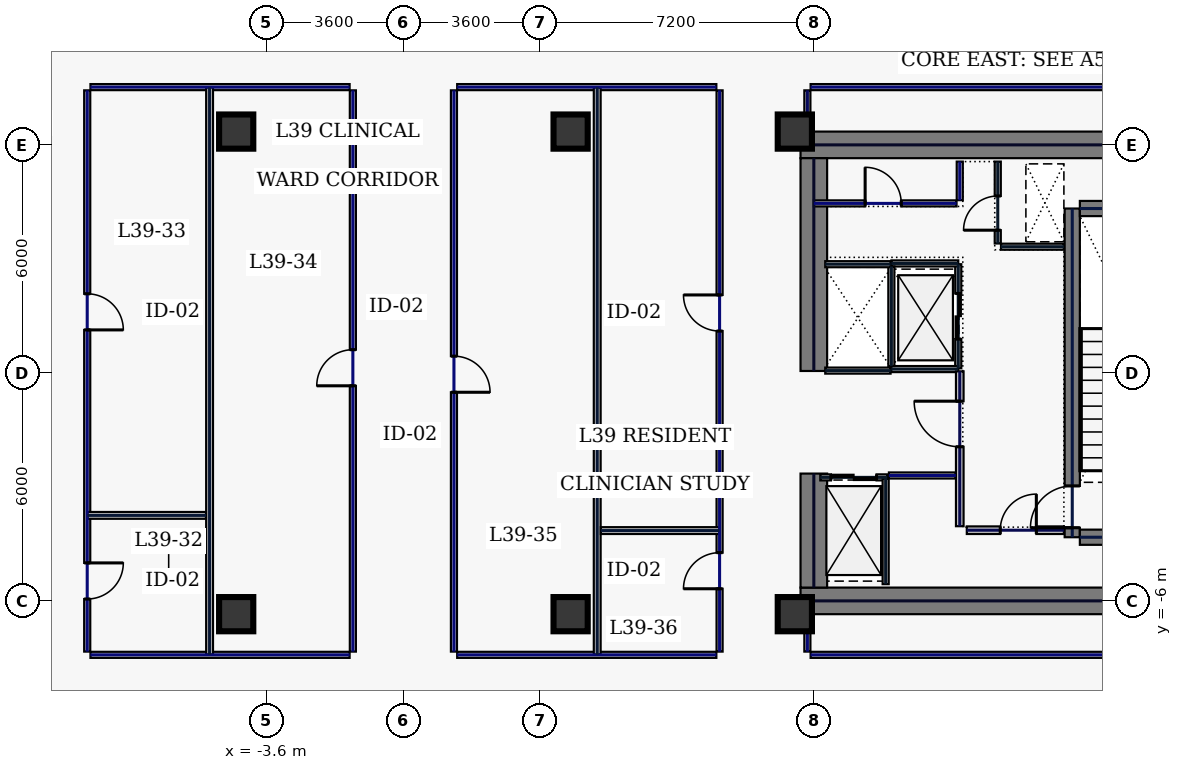
"""IFC4 building model, lengths in metres.
Left out: names, types, materials, properties, quantities, classifications, styles, units other than length and angle.
Written with IfcOpenShell. Run it as: python <this file> out.ifc"""

import sys

from ifc_helpers import new_model, si_unit, direction, frame, frame_2d, origin, origin_2d, place, context, subcontext, project, spatial, rectangle, hollow_rectangle, extrude, element, fill, save


model = new_model("IFC4")
c1 = context("Model", 3, precision=1e-05, world=origin(), true_north=direction((0.0, 1.0)))
c2 = subcontext(c1, "Body", "Model", "MODEL_VIEW")
j1 = project(units=[si_unit("LENGTHUNIT", "METRE"), si_unit("PLANEANGLEUNIT", "RADIAN")], contexts=[c1])
p1 = place(None, origin())
s1 = spatial("IfcSite", under=j1, at=p1, CompositionType="ELEMENT")
p2 = place(p1, origin())
s2 = spatial("IfcBuilding", under=s1, at=p2, CompositionType="ELEMENT")
p3 = place(p2, frame((0.0, 0.0, 172.2)))
s3 = spatial("IfcBuildingStorey", under=s2, at=p3, CompositionType="ELEMENT", Elevation=172.2)
for number, where, z_axis, x_axis in (
    (1, (10.45, 6.0, 0.0), (0.0, 0.0, 1.0), (1.0, 0.0, 0.0)),
    (2, (10.45, -6.0, 0.0), (0.0, 0.0, 1.0), (1.0, 0.0, 0.0)),
):
    element("IfcWall", number, at=place(p3, frame(where, z_axis=z_axis, x_axis=x_axis)), inside=s3, PredefinedType="SHEAR", context=c2, shape_type="SweptSolid", body=[
        extrude(rectangle(XDim=11.55, YDim=0.7, at=frame_2d((5.775, 0.0))), origin(), (0.0, 0.0, 1.0), 3.74),
    ])
p4 = place(p3, frame((10.8, -5.65, 0.0), z_axis=(0.0, 0.0, 1.0), x_axis=(0.0, 1.0, 0.0)))
e3 = element("IfcWall", 3, at=p4, inside=s3, PredefinedType="SHEAR", context=c2, shape_type="SweptSolid", body=[
    extrude(rectangle(XDim=3.0, YDim=0.7, at=frame_2d((1.5, 0.0))), origin(), (0.0, 0.0, 1.0), 3.74),
])
p5 = place(p3, frame((10.8, 0.05, 0.0), z_axis=(0.0, 0.0, 1.0), x_axis=(0.0, 1.0, 0.0)))
e4 = element("IfcWall", 4, at=p5, inside=s3, PredefinedType="SHEAR", context=c2, shape_type="SweptSolid", body=[
    extrude(rectangle(XDim=5.6, YDim=0.7, at=frame_2d((2.8, 0.0))), origin(), (0.0, 0.0, 1.0), 3.74),
])
p6 = place(p3, frame((17.6, -4.325, 0.0), z_axis=(0.0, 0.0, 1.0), x_axis=(0.0, 1.0, 0.0)))
e5 = element("IfcWall", 5, at=p6, inside=s3, PredefinedType="SHEAR", context=c2, shape_type="SweptSolid", body=[
    extrude(rectangle(XDim=8.65, YDim=0.4, at=frame_2d((4.325, 0.0))), origin(), (0.0, 0.0, 1.0), 3.74),
])
p7 = place(p6, frame((0.25, 0.0, 0.0)))
e6 = element("IfcOpeningElement", 6, at=p7, cuts=e5, PredefinedType="OPENING", context=c2, shape_type="SweptSolid", body=[
    extrude(rectangle(XDim=1.1, YDim=2.2, at=frame_2d((0.55, 1.1))), frame((0.0, 0.21, 0.0), z_axis=(0.0, -1.0, 0.0), x_axis=(1.0, 0.0, 0.0)), (0.0, 0.0, 1.0), 0.42),
])
for number, where, z_axis, x_axis in (
    (7, (17.8, -4.325, 0.0), (0.0, 0.0, 1.0), (1.0, 0.0, 0.0)),
    (8, (17.8, 4.325, 0.0), (0.0, 0.0, 1.0), (1.0, 0.0, 0.0)),
):
    element("IfcWall", number, at=place(p3, frame(where, z_axis=z_axis, x_axis=x_axis)), inside=s3, PredefinedType="SHEAR", context=c2, shape_type="SweptSolid", body=[
        extrude(rectangle(XDim=3.4, YDim=0.4, at=frame_2d((1.7, 0.0))), origin(), (0.0, 0.0, 1.0), 3.74),
    ])
for number, where, z_axis, x_axis in (
    (9, (10.3, -6.35, 0.0), (0.0, 0.0, 1.0), (1.0, 0.0, 0.0)),
    (10, (10.3, 6.35, 0.0), (0.0, 0.0, 1.0), (1.0, 0.0, 0.0)),
    (11, (-4.4, -6.35, 0.0), (0.0, 0.0, 1.0), (1.0, 0.0, 0.0)),
    (12, (4.4, -6.35, 0.0), (0.0, 0.0, 1.0), (1.0, 0.0, 0.0)),
    (13, (-4.4, 6.35, 0.0), (0.0, 0.0, 1.0), (1.0, 0.0, 0.0)),
    (14, (4.4, 6.35, 0.0), (0.0, 0.0, 1.0), (1.0, 0.0, 0.0)),
):
    element("IfcColumn", number, at=place(p3, frame(where, z_axis=z_axis, x_axis=x_axis)), inside=s3, PredefinedType="COLUMN", context=c2, shape_type="SweptSolid", body=[
        extrude(hollow_rectangle(XDim=0.9, YDim=0.9, WallThickness=0.04, at=origin_2d()), origin(), (0.0, 0.0, 1.0), 3.74),
    ])
p8 = place(p3, frame((14.6, 0.12, 0.0), z_axis=(0.0, 0.0, 1.0), x_axis=(0.0, 1.0, 0.0)))
e15 = element("IfcWall", 15, at=p8, inside=s3, PredefinedType="PARTITIONING", context=c2, shape_type="SweptSolid", body=[
    extrude(rectangle(XDim=2.74, YDim=0.16, at=frame_2d((1.37, 0.0))), origin(), (0.0, 0.0, 1.0), 3.74),
])
p9 = place(p8, frame((0.77, 0.0, 0.0)))
e16 = element("IfcOpeningElement", 16, at=p9, cuts=e15, PredefinedType="OPENING", context=c2, shape_type="SweptSolid", body=[
    extrude(rectangle(XDim=1.2, YDim=2.2, at=frame_2d((0.6, 1.1))), frame((0.0, 0.09, 0.0), z_axis=(0.0, -1.0, 0.0), x_axis=(1.0, 0.0, 0.0)), (0.0, 0.0, 1.0), 0.18),
])
for number, where, z_axis, x_axis in (
    (17, (12.84, 0.1, 0.0), (0.0, 0.0, 1.0), (1.0, 0.0, 0.0)),
    (18, (12.84, 2.88, 0.0), (0.0, 0.0, 1.0), (1.0, 0.0, 0.0)),
):
    element("IfcWall", number, at=place(p3, frame(where, z_axis=z_axis, x_axis=x_axis)), inside=s3, PredefinedType="PARTITIONING", context=c2, shape_type="SweptSolid", body=[
        extrude(rectangle(XDim=1.76, YDim=0.16, at=frame_2d((0.88, 0.0))), origin(), (0.0, 0.0, 1.0), 3.74),
    ])
p10 = place(p3, frame((12.84, 0.18, 0.0), z_axis=(0.0, 0.0, 1.0), x_axis=(0.0, 1.0, 0.0)))
e19 = element("IfcWall", 19, at=p10, inside=s3, PredefinedType="PARTITIONING", context=c2, shape_type="SweptSolid", body=[
    extrude(rectangle(XDim=2.62, YDim=0.16, at=frame_2d((1.31, 0.0))), origin(), (0.0, 0.0, 1.0), 3.74),
])
p11 = place(p3, frame((10.97, -2.75, 0.0), z_axis=(0.0, 0.0, 1.0), x_axis=(1.0, 0.0, 0.0)))
e20 = element("IfcWall", 20, at=p11, inside=s3, PredefinedType="PARTITIONING", context=c2, shape_type="SweptSolid", body=[
    extrude(rectangle(XDim=1.76, YDim=0.16, at=frame_2d((0.88, 0.0))), origin(), (0.0, 0.0, 1.0), 3.74),
])
p12 = place(p11, frame((0.28, 0.0, 0.0)))
e21 = element("IfcOpeningElement", 21, at=p12, cuts=e20, PredefinedType="OPENING", context=c2, shape_type="SweptSolid", body=[
    extrude(rectangle(XDim=1.2, YDim=2.2, at=frame_2d((0.6, 1.1))), frame((0.0, 0.09, 0.0), z_axis=(0.0, -1.0, 0.0), x_axis=(1.0, 0.0, 0.0)), (0.0, 0.0, 1.0), 0.18),
])
for number, where, z_axis, x_axis in (
    (22, (11.1, 0.06, 0.0), (0.0, 0.0, 1.0), (1.0, 0.0, 0.0)),
    (23, (11.1, 2.86, 0.0), (0.0, 0.0, 1.0), (1.0, 0.0, 0.0)),
):
    element("IfcWall", number, at=place(p3, frame(where, z_axis=z_axis, x_axis=x_axis)), inside=s3, PredefinedType="PARTITIONING", context=c2, shape_type="SweptSolid", body=[
        extrude(rectangle(XDim=1.72, YDim=0.16, at=frame_2d((0.86, 0.0))), origin(), (0.0, 0.0, 1.0), 3.74),
    ])
p13 = place(p3, frame((15.64, 3.405, 0.0), z_axis=(0.0, 0.0, 1.0), x_axis=(0.0, 1.0, 0.0)))
e24 = element("IfcWall", 24, at=p13, inside=s3, PredefinedType="PARTITIONING", context=c2, shape_type="SweptSolid", body=[
    extrude(rectangle(XDim=2.155, YDim=0.16, at=frame_2d((1.078, 0.0))), origin(), (0.0, 0.0, 1.0), 3.74),
])
p14 = place(p13, frame((0.35, 0.0, 0.0)))
e25 = element("IfcOpeningElement", 25, at=p14, cuts=e24, PredefinedType="OPENING", context=c2, shape_type="SweptSolid", body=[
    extrude(rectangle(XDim=0.9, YDim=2.2, at=frame_2d((0.45, 1.1))), frame((0.0, 0.09, 0.0), z_axis=(0.0, -1.0, 0.0), x_axis=(1.0, 0.0, 0.0)), (0.0, 0.0, 1.0), 0.18),
])
p15 = place(p3, frame((15.725, 3.32, 0.0), z_axis=(0.0, 0.0, 1.0), x_axis=(1.0, 0.0, 0.0)))
e26 = element("IfcWall", 26, at=p15, inside=s3, PredefinedType="PARTITIONING", context=c2, shape_type="SweptSolid", body=[
    extrude(rectangle(XDim=1.655, YDim=0.16, at=frame_2d((0.827, 0.0))), origin(), (0.0, 0.0, 1.0), 3.74),
])
p16 = place(p3, frame((14.825, -4.14, 0.0), z_axis=(0.0, 0.0, 1.0), x_axis=(1.0, 0.0, 0.0)))
e27 = element("IfcWall", 27, at=p16, inside=s3, PredefinedType="SOLIDWALL", context=c2, shape_type="SweptSolid", body=[
    extrude(rectangle(XDim=2.555, YDim=0.2, at=frame_2d((1.277, 0.0))), origin(), (0.0, 0.0, 1.0), 3.74),
])
p17 = place(p16, frame((0.88, 0.0, 0.0)))
e28 = element("IfcOpeningElement", 28, at=p17, cuts=e27, PredefinedType="OPENING", context=c2, shape_type="SweptSolid", body=[
    extrude(rectangle(XDim=0.95, YDim=2.2, at=frame_2d((0.475, 1.1))), frame((0.0, 0.11, 0.0), z_axis=(0.0, -1.0, 0.0), x_axis=(1.0, 0.0, 0.0)), (0.0, 0.0, 1.0), 0.22),
])
p18 = place(p3, frame((12.775, -2.7, 0.0), z_axis=(0.0, 0.0, 1.0), x_axis=(1.0, 0.0, 0.0)))
e29 = element("IfcWall", 29, at=p18, inside=s3, PredefinedType="PARTITIONING", context=c2, shape_type="SweptSolid", body=[
    extrude(rectangle(XDim=1.76, YDim=0.16, at=frame_2d((0.88, 0.0))), origin(), (0.0, 0.0, 1.0), 3.74),
])
p19 = place(p3, frame((12.69, -5.56, 0.0), z_axis=(0.0, 0.0, 1.0), x_axis=(0.0, 1.0, 0.0)))
e30 = element("IfcWall", 30, at=p19, inside=s3, PredefinedType="PARTITIONING", context=c2, shape_type="SweptSolid", body=[
    extrude(rectangle(XDim=2.775, YDim=0.16, at=frame_2d((1.388, 0.0))), origin(), (0.0, 0.0, 1.0), 3.74),
])
p20 = place(p3, frame((10.8, 4.46, 0.0), z_axis=(0.0, 0.0, 1.0), x_axis=(1.0, 0.0, 0.0)))
e31 = element("IfcWall", 31, at=p20, inside=s3, PredefinedType="PARTITIONING", context=c2, shape_type="SweptSolid", body=[
    extrude(rectangle(XDim=3.755, YDim=0.16, at=frame_2d((1.877, 0.0))), origin(), (0.0, 0.0, 1.0), 3.74),
])
p21 = place(p20, frame((1.35, 0.0, 0.0)))
e32 = element("IfcOpeningElement", 32, at=p21, cuts=e31, PredefinedType="OPENING", context=c2, shape_type="SweptSolid", body=[
    extrude(rectangle(XDim=0.95, YDim=2.2, at=frame_2d((0.475, 1.1))), frame((0.0, 0.09, 0.0), z_axis=(0.0, -1.0, 0.0), x_axis=(1.0, 0.0, 0.0)), (0.0, 0.0, 1.0), 0.18),
])
p22 = place(p3, frame((14.64, 4.545, 0.0), z_axis=(0.0, 0.0, 1.0), x_axis=(0.0, 1.0, 0.0)))
e33 = element("IfcWall", 33, at=p22, inside=s3, PredefinedType="PARTITIONING", context=c2, shape_type="SweptSolid", body=[
    extrude(rectangle(XDim=1.015, YDim=0.16, at=frame_2d((0.508, 0.0))), origin(), (0.0, 0.0, 1.0), 3.74),
])
p23 = place(p3, frame((14.64, -4.035, 0.0), z_axis=(0.0, 0.0, 1.0), x_axis=(0.0, 1.0, 0.0)))
e34 = element("IfcWall", 34, at=p23, inside=s3, PredefinedType="SOLIDWALL", context=c2, shape_type="SweptSolid", body=[
    extrude(rectangle(XDim=4.075, YDim=0.2, at=frame_2d((2.038, 0.0))), origin(), (0.0, 0.0, 1.0), 3.74),
])
p24 = place(p23, frame((2.09, 0.0, 0.0)))
e35 = element("IfcOpeningElement", 35, at=p24, cuts=e34, PredefinedType="OPENING", context=c2, shape_type="SweptSolid", body=[
    extrude(rectangle(XDim=1.2, YDim=2.2, at=frame_2d((0.6, 1.1))), frame((0.0, 0.11, 0.0), z_axis=(0.0, -1.0, 0.0), x_axis=(1.0, 0.0, 0.0)), (0.0, 0.0, 1.0), 0.22),
])
p25 = place(p3, frame((24.965, 7.52, 0.0), z_axis=(0.0, 0.0, 1.0), x_axis=(-1.0, 0.0, 0.0)))
e36 = element("IfcWall", 36, at=p25, inside=s3, PredefinedType="PARTITIONING", context=c2, shape_type="SweptSolid", body=[
    extrude(rectangle(XDim=14.25, YDim=0.16, at=frame_2d((7.125, 0.0))), origin(), (0.0, 0.0, 1.0), 3.74),
])
p26 = place(p3, frame((10.63, 7.435, 0.0), z_axis=(0.0, 0.0, 1.0), x_axis=(0.0, -1.0, 0.0)))
e37 = element("IfcWall", 37, at=p26, inside=s3, PredefinedType="PARTITIONING", context=c2, shape_type="SweptSolid", body=[
    extrude(rectangle(XDim=1.015, YDim=0.16, at=frame_2d((0.508, 0.0))), origin(), (0.0, 0.0, 1.0), 1.535),
])
p27 = place(p3, frame((10.63, -6.42, 0.0), z_axis=(0.0, 0.0, 1.0), x_axis=(0.0, -1.0, 0.0)))
e38 = element("IfcWall", 38, at=p27, inside=s3, PredefinedType="PARTITIONING", context=c2, shape_type="SweptSolid", body=[
    extrude(rectangle(XDim=0.915, YDim=0.16, at=frame_2d((0.458, 0.0))), origin(), (0.0, 0.0, 1.0), 3.74),
])
p28 = place(p3, frame((10.715, -7.42, 0.0), z_axis=(0.0, 0.0, 1.0), x_axis=(1.0, 0.0, 0.0)))
e39 = element("IfcWall", 39, at=p28, inside=s3, PredefinedType="PARTITIONING", context=c2, shape_type="SweptSolid", body=[
    extrude(rectangle(XDim=14.25, YDim=0.16, at=frame_2d((7.125, 0.0))), origin(), (0.0, 0.0, 1.0), 3.74),
])
p29 = place(p3, frame((8.235, 7.52, 0.0), z_axis=(0.0, 0.0, 1.0), x_axis=(-1.0, 0.0, 0.0)))
e40 = element("IfcWall", 40, at=p29, inside=s3, PredefinedType="PARTITIONING", context=c2, shape_type="SweptSolid", body=[
    extrude(rectangle(XDim=6.82, YDim=0.16, at=frame_2d((3.41, 0.0))), origin(), (0.0, 0.0, 1.0), 3.74),
])
p30 = place(p3, frame((1.33, 7.435, 0.0), z_axis=(0.0, 0.0, 1.0), x_axis=(0.0, -1.0, 0.0)))
e41 = element("IfcWall", 41, at=p30, inside=s3, PredefinedType="PARTITIONING", context=c2, shape_type="SweptSolid", body=[
    extrude(rectangle(XDim=14.77, YDim=0.16, at=frame_2d((7.385, 0.0))), origin(), (0.0, 0.0, 1.0), 3.74),
])
p31 = place(p30, frame((6.995, 0.0, 0.0)))
e42 = element("IfcOpeningElement", 42, at=p31, cuts=e41, PredefinedType="OPENING", context=c2, shape_type="SweptSolid", body=[
    extrude(rectangle(XDim=0.95, YDim=2.2, at=frame_2d((0.475, 1.1))), frame((0.0, 0.09, 0.0), z_axis=(0.0, -1.0, 0.0), x_axis=(1.0, 0.0, 0.0)), (0.0, 0.0, 1.0), 0.18),
])
p32 = place(p3, frame((1.415, -7.42, 0.0), z_axis=(0.0, 0.0, 1.0), x_axis=(1.0, 0.0, 0.0)))
e43 = element("IfcWall", 43, at=p32, inside=s3, PredefinedType="PARTITIONING", context=c2, shape_type="SweptSolid", body=[
    extrude(rectangle(XDim=6.82, YDim=0.16, at=frame_2d((3.41, 0.0))), origin(), (0.0, 0.0, 1.0), 3.74),
])
p33 = place(p3, frame((8.32, -7.335, 0.0), z_axis=(0.0, 0.0, 1.0), x_axis=(0.0, 1.0, 0.0)))
e44 = element("IfcWall", 44, at=p33, inside=s3, PredefinedType="PARTITIONING", context=c2, shape_type="SweptSolid", body=[
    extrude(rectangle(XDim=14.77, YDim=0.16, at=frame_2d((7.385, 0.0))), origin(), (0.0, 0.0, 1.0), 3.74),
])
p34 = place(p33, frame((1.654, 0.0, 0.0)))
e45 = element("IfcOpeningElement", 45, at=p34, cuts=e44, PredefinedType="OPENING", context=c2, shape_type="SweptSolid", body=[
    extrude(rectangle(XDim=0.95, YDim=2.2, at=frame_2d((0.475, 1.1))), frame((0.0, 0.09, 0.0), z_axis=(0.0, -1.0, 0.0), x_axis=(1.0, 0.0, 0.0)), (0.0, 0.0, 1.0), 0.18),
])
p35 = place(p33, frame((8.436, 0.0, 0.0)))
e46 = element("IfcOpeningElement", 46, at=p35, cuts=e44, PredefinedType="OPENING", context=c2, shape_type="SweptSolid", body=[
    extrude(rectangle(XDim=0.95, YDim=2.2, at=frame_2d((0.475, 1.1))), frame((0.0, 0.09, 0.0), z_axis=(0.0, -1.0, 0.0), x_axis=(1.0, 0.0, 0.0)), (0.0, 0.0, 1.0), 0.18),
])
p36 = place(p3, frame((-1.33, -7.335, 0.0), z_axis=(0.0, 0.0, 1.0), x_axis=(0.0, 1.0, 0.0)))
e47 = element("IfcWall", 47, at=p36, inside=s3, PredefinedType="PARTITIONING", context=c2, shape_type="SweptSolid", body=[
    extrude(rectangle(XDim=14.77, YDim=0.16, at=frame_2d((7.385, 0.0))), origin(), (0.0, 0.0, 1.0), 3.74),
])
p37 = place(p36, frame((6.995, 0.0, 0.0)))
e48 = element("IfcOpeningElement", 48, at=p37, cuts=e47, PredefinedType="OPENING", context=c2, shape_type="SweptSolid", body=[
    extrude(rectangle(XDim=0.95, YDim=2.2, at=frame_2d((0.475, 1.1))), frame((0.0, 0.09, 0.0), z_axis=(0.0, -1.0, 0.0), x_axis=(1.0, 0.0, 0.0)), (0.0, 0.0, 1.0), 0.18),
])
p38 = place(p3, frame((-1.415, 7.52, 0.0), z_axis=(0.0, 0.0, 1.0), x_axis=(-1.0, 0.0, 0.0)))
e49 = element("IfcWall", 49, at=p38, inside=s3, PredefinedType="PARTITIONING", context=c2, shape_type="SweptSolid", body=[
    extrude(rectangle(XDim=6.82, YDim=0.16, at=frame_2d((3.41, 0.0))), origin(), (0.0, 0.0, 1.0), 3.74),
])
p39 = place(p3, frame((-8.32, 7.435, 0.0), z_axis=(0.0, 0.0, 1.0), x_axis=(0.0, -1.0, 0.0)))
e50 = element("IfcWall", 50, at=p39, inside=s3, PredefinedType="PARTITIONING", context=c2, shape_type="SweptSolid", body=[
    extrude(rectangle(XDim=14.77, YDim=0.16, at=frame_2d((7.385, 0.0))), origin(), (0.0, 0.0, 1.0), 3.74),
])
p40 = place(p39, frame((12.436, 0.0, 0.0)))
e51 = element("IfcOpeningElement", 51, at=p40, cuts=e50, PredefinedType="OPENING", context=c2, shape_type="SweptSolid", body=[
    extrude(rectangle(XDim=0.95, YDim=2.2, at=frame_2d((0.475, 1.1))), frame((0.0, 0.09, 0.0), z_axis=(0.0, -1.0, 0.0), x_axis=(1.0, 0.0, 0.0)), (0.0, 0.0, 1.0), 0.18),
])
p41 = place(p39, frame((5.354, 0.0, 0.0)))
e52 = element("IfcOpeningElement", 52, at=p41, cuts=e50, PredefinedType="OPENING", context=c2, shape_type="SweptSolid", body=[
    extrude(rectangle(XDim=0.95, YDim=2.2, at=frame_2d((0.475, 1.1))), frame((0.0, 0.09, 0.0), z_axis=(0.0, -1.0, 0.0), x_axis=(1.0, 0.0, 0.0)), (0.0, 0.0, 1.0), 0.18),
])
p42 = place(p3, frame((-8.235, -7.42, 0.0), z_axis=(0.0, 0.0, 1.0), x_axis=(1.0, 0.0, 0.0)))
e53 = element("IfcWall", 53, at=p42, inside=s3, PredefinedType="PARTITIONING", context=c2, shape_type="SweptSolid", body=[
    extrude(rectangle(XDim=6.82, YDim=0.16, at=frame_2d((3.41, 0.0))), origin(), (0.0, 0.0, 1.0), 3.74),
])
for number, where, z_axis, x_axis in (
    (54, (-5.1, -7.415, 0.0), (0.0, 0.0, 1.0), (0.0, 1.0, 0.0)),
    (55, (5.1, -7.415, 0.0), (0.0, 0.0, 1.0), (0.0, 1.0, 0.0)),
):
    element("IfcWall", number, at=place(p3, frame(where, z_axis=z_axis, x_axis=x_axis)), inside=s3, PredefinedType="PARTITIONING", context=c2, shape_type="SweptSolid", body=[
        extrude(rectangle(XDim=14.93, YDim=0.18, at=frame_2d((7.465, 0.0))), origin(), (0.0, 0.0, 1.0), 3.74),
    ])
for number, where, z_axis, x_axis in (
    (56, (-8.315, -3.75, 0.0), (0.0, 0.0, 1.0), (1.0, 0.0, 0.0)),
    (57, (5.195, -4.15, 0.0), (0.0, 0.0, 1.0), (1.0, 0.0, 0.0)),
):
    element("IfcWall", number, at=place(p3, frame(where, z_axis=z_axis, x_axis=x_axis)), inside=s3, PredefinedType="PARTITIONING", context=c2, shape_type="SweptSolid", body=[
        extrude(rectangle(XDim=3.12, YDim=0.18, at=frame_2d((1.56, 0.0))), origin(), (0.0, 0.0, 1.0), 3.74),
    ])
p43 = place(p7, origin())
e58 = element("IfcDoor", 58, at=p43, inside=s3, OperationType="SINGLE_SWING_LEFT", PredefinedType="DOOR", context=c2, shape_type="SweptSolid", body=[
    extrude(rectangle(XDim=1.1, YDim=2.2, at=frame_2d((0.55, 1.1))), frame((0.0, 0.025, 0.0), z_axis=(0.0, -1.0, 0.0), x_axis=(1.0, 0.0, 0.0)), (0.0, 0.0, 1.0), 0.05),
])
fill(e6, e58)
p44 = place(p9, origin())
e59 = element("IfcDoor", 59, at=p44, inside=s3, OperationType="SLIDING_TO_LEFT", PredefinedType="DOOR", context=c2, shape_type="SweptSolid", body=[
    extrude(rectangle(XDim=1.2, YDim=2.2, at=frame_2d((0.6, 1.1))), frame((0.0, 0.025, 0.0), z_axis=(0.0, -1.0, 0.0), x_axis=(1.0, 0.0, 0.0)), (0.0, 0.0, 1.0), 0.05),
])
fill(e16, e59)
p45 = place(p12, origin())
e60 = element("IfcDoor", 60, at=p45, inside=s3, OperationType="SLIDING_TO_LEFT", PredefinedType="DOOR", context=c2, shape_type="SweptSolid", body=[
    extrude(rectangle(XDim=1.2, YDim=2.2, at=frame_2d((0.6, 1.1))), frame((0.0, 0.025, 0.0), z_axis=(0.0, -1.0, 0.0), x_axis=(1.0, 0.0, 0.0)), (0.0, 0.0, 1.0), 0.05),
])
fill(e21, e60)
p46 = place(p14, origin())
e61 = element("IfcDoor", 61, at=p46, inside=s3, OperationType="SINGLE_SWING_LEFT", PredefinedType="DOOR", context=c2, shape_type="SweptSolid", body=[
    extrude(rectangle(XDim=0.9, YDim=2.2, at=frame_2d((0.45, 1.1))), frame((0.0, 0.025, 0.0), z_axis=(0.0, -1.0, 0.0), x_axis=(1.0, 0.0, 0.0)), (0.0, 0.0, 1.0), 0.05),
])
fill(e25, e61)
p47 = place(p17, origin())
e62 = element("IfcDoor", 62, at=p47, inside=s3, OperationType="SINGLE_SWING_RIGHT", PredefinedType="DOOR", context=c2, shape_type="SweptSolid", body=[
    extrude(rectangle(XDim=0.95, YDim=2.2, at=frame_2d((0.475, 1.1))), frame((0.0, 0.025, 0.0), z_axis=(0.0, -1.0, 0.0), x_axis=(1.0, 0.0, 0.0)), (0.0, 0.0, 1.0), 0.05),
])
fill(e28, e62)
p48 = place(p21, origin())
e63 = element("IfcDoor", 63, at=p48, inside=s3, OperationType="SINGLE_SWING_LEFT", PredefinedType="DOOR", context=c2, shape_type="SweptSolid", body=[
    extrude(rectangle(XDim=0.95, YDim=2.2, at=frame_2d((0.475, 1.1))), frame((0.0, 0.025, 0.0), z_axis=(0.0, -1.0, 0.0), x_axis=(1.0, 0.0, 0.0)), (0.0, 0.0, 1.0), 0.05),
])
fill(e32, e63)
p49 = place(p24, origin())
e64 = element("IfcDoor", 64, at=p49, inside=s3, OperationType="SINGLE_SWING_RIGHT", PredefinedType="DOOR", context=c2, shape_type="SweptSolid", body=[
    extrude(rectangle(XDim=1.2, YDim=2.2, at=frame_2d((0.6, 1.1))), frame((0.0, 0.025, 0.0), z_axis=(0.0, -1.0, 0.0), x_axis=(1.0, 0.0, 0.0)), (0.0, 0.0, 1.0), 0.05),
])
fill(e35, e64)
p50 = place(p40, origin())
e65 = element("IfcDoor", 65, at=p50, inside=s3, OperationType="SINGLE_SWING_LEFT", PredefinedType="DOOR", context=c2, shape_type="SweptSolid", body=[
    extrude(rectangle(XDim=0.95, YDim=2.2, at=frame_2d((0.475, 1.1))), frame((0.0, 0.025, 0.0), z_axis=(0.0, -1.0, 0.0), x_axis=(1.0, 0.0, 0.0)), (0.0, 0.0, 1.0), 0.05),
])
fill(e51, e65)
p51 = place(p41, origin())
e66 = element("IfcDoor", 66, at=p51, inside=s3, OperationType="SINGLE_SWING_RIGHT", PredefinedType="DOOR", context=c2, shape_type="SweptSolid", body=[
    extrude(rectangle(XDim=0.95, YDim=2.2, at=frame_2d((0.475, 1.1))), frame((0.0, 0.025, 0.0), z_axis=(0.0, -1.0, 0.0), x_axis=(1.0, 0.0, 0.0)), (0.0, 0.0, 1.0), 0.05),
])
fill(e52, e66)
p52 = place(p37, origin())
e67 = element("IfcDoor", 67, at=p52, inside=s3, OperationType="SINGLE_SWING_LEFT", PredefinedType="DOOR", context=c2, shape_type="SweptSolid", body=[
    extrude(rectangle(XDim=0.95, YDim=2.2, at=frame_2d((0.475, 1.1))), frame((0.0, 0.025, 0.0), z_axis=(0.0, -1.0, 0.0), x_axis=(1.0, 0.0, 0.0)), (0.0, 0.0, 1.0), 0.05),
])
fill(e48, e67)
p53 = place(p31, origin())
e68 = element("IfcDoor", 68, at=p53, inside=s3, OperationType="SINGLE_SWING_RIGHT", PredefinedType="DOOR", context=c2, shape_type="SweptSolid", body=[
    extrude(rectangle(XDim=0.95, YDim=2.2, at=frame_2d((0.475, 1.1))), frame((0.0, 0.025, 0.0), z_axis=(0.0, -1.0, 0.0), x_axis=(1.0, 0.0, 0.0)), (0.0, 0.0, 1.0), 0.05),
])
fill(e42, e68)
p54 = place(p34, origin())
e69 = element("IfcDoor", 69, at=p54, inside=s3, OperationType="SINGLE_SWING_LEFT", PredefinedType="DOOR", context=c2, shape_type="SweptSolid", body=[
    extrude(rectangle(XDim=0.95, YDim=2.2, at=frame_2d((0.475, 1.1))), frame((0.0, 0.025, 0.0), z_axis=(0.0, -1.0, 0.0), x_axis=(1.0, 0.0, 0.0)), (0.0, 0.0, 1.0), 0.05),
])
fill(e45, e69)
p55 = place(p35, origin())
e70 = element("IfcDoor", 70, at=p55, inside=s3, OperationType="SINGLE_SWING_RIGHT", PredefinedType="DOOR", context=c2, shape_type="SweptSolid", body=[
    extrude(rectangle(XDim=0.95, YDim=2.2, at=frame_2d((0.475, 1.1))), frame((0.0, 0.025, 0.0), z_axis=(0.0, -1.0, 0.0), x_axis=(1.0, 0.0, 0.0)), (0.0, 0.0, 1.0), 0.05),
])
fill(e46, e70)
save(model, sys.argv[1])
